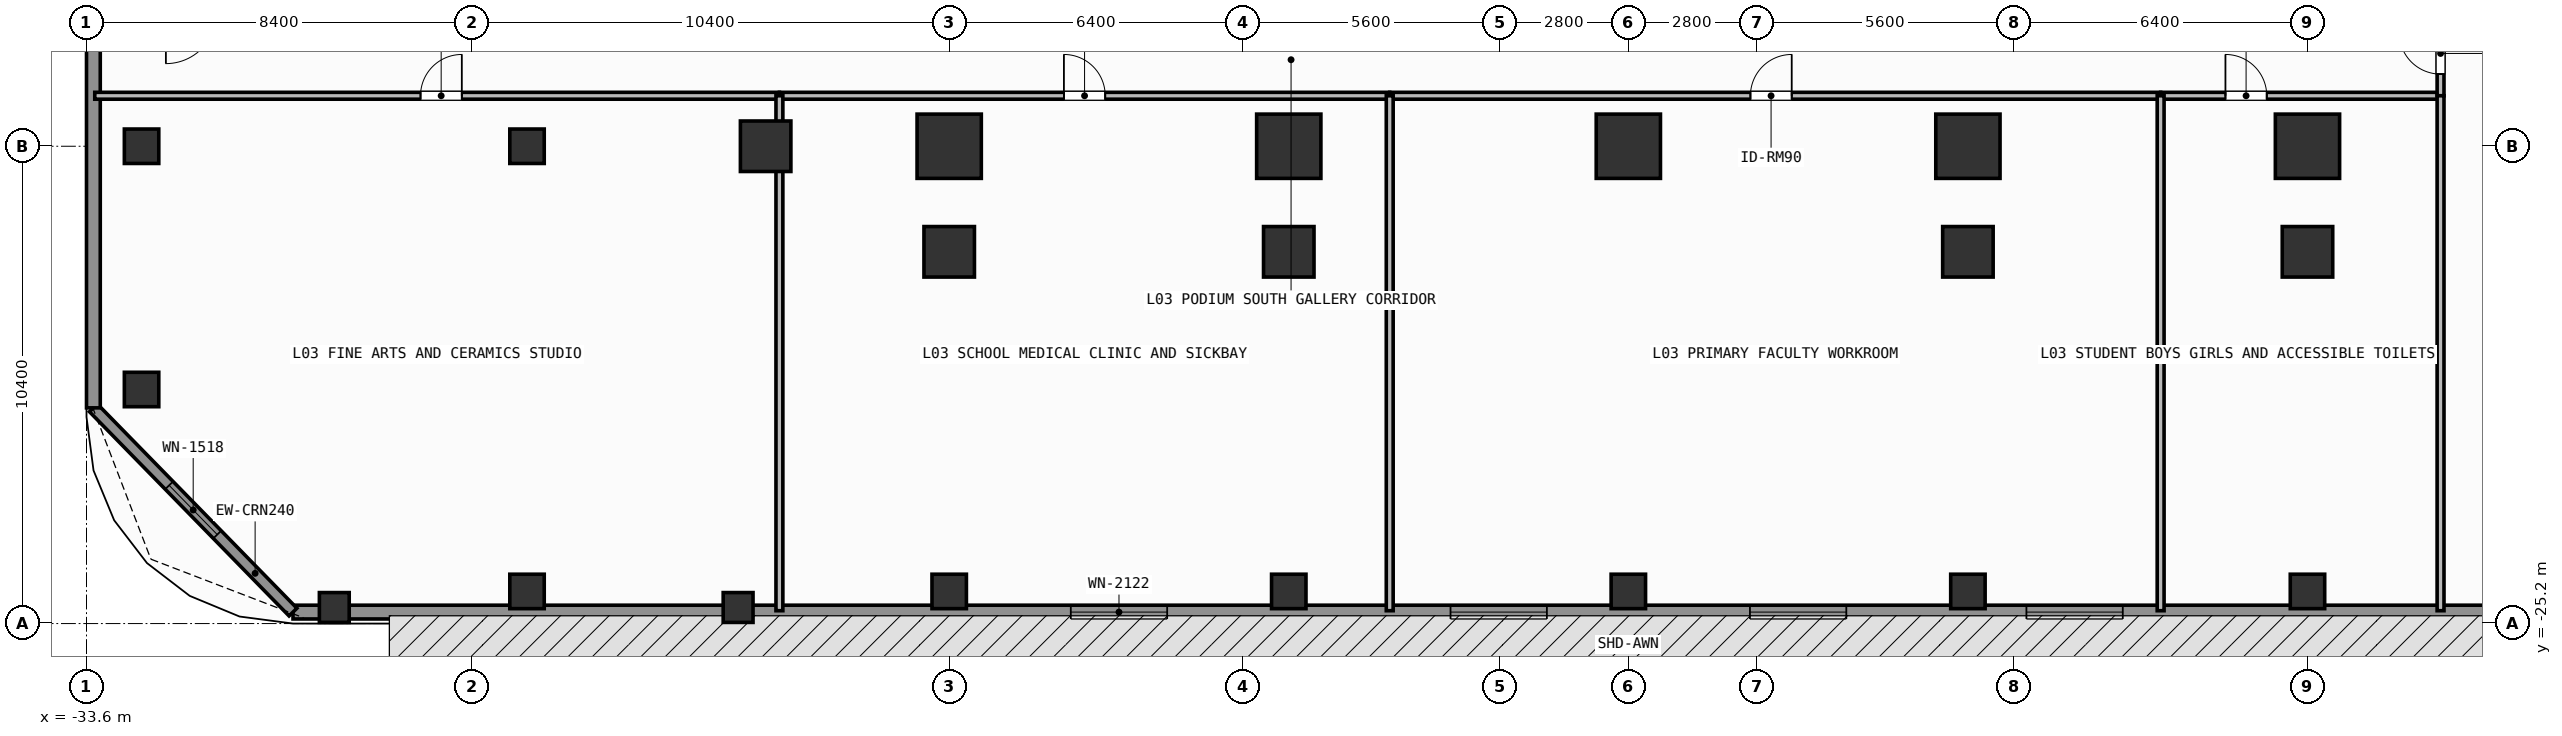
"""IFC4 building model, lengths in metres.
Left out: names, types, materials, properties, quantities, classifications, styles, units other than length and angle.
Written with IfcOpenShell. Run it as: python <this file> out.ifc"""

import sys

from ifc_helpers import new_model, si_unit, direction, frame, frame_2d, origin, origin_2d, place, context, subcontext, project, spatial, rectangle, extrude, element, fill, save


model = new_model("IFC4")
c1 = context("Model", 3, precision=1e-05, world=origin(), true_north=direction((0.0, 1.0)))
c2 = subcontext(c1, "Body", "Model", "MODEL_VIEW")
j1 = project(units=[si_unit("LENGTHUNIT", "METRE"), si_unit("PLANEANGLEUNIT", "RADIAN")], contexts=[c1])
p1 = place(None, origin())
s1 = spatial("IfcSite", under=j1, at=p1, CompositionType="ELEMENT")
p2 = place(p1, origin())
s2 = spatial("IfcBuilding", under=s1, at=p2, CompositionType="ELEMENT")
p3 = place(p2, frame((0.0, 0.0, 9.0)))
s3 = spatial("IfcBuildingStorey", under=s2, at=p3, CompositionType="ELEMENT", Elevation=9.0)
for number, where, z_axis, x_axis in (
    (1, (-14.8, -14.8, 0.0), (0.0, 0.0, 1.0), (1.0, 0.0, 0.0)),
    (2, (-7.4, -14.8, 0.0), (0.0, 0.0, 1.0), (1.0, 0.0, 0.0)),
    (3, (0.0, -14.8, 0.0), (0.0, 0.0, 1.0), (1.0, 0.0, 0.0)),
    (4, (7.4, -14.8, 0.0), (0.0, 0.0, 1.0), (1.0, 0.0, 0.0)),
    (5, (14.8, -14.8, 0.0), (0.0, 0.0, 1.0), (1.0, 0.0, 0.0)),
):
    element("IfcColumn", number, at=place(p3, frame(where, z_axis=z_axis, x_axis=x_axis)), inside=s3, PredefinedType="COLUMN", context=c2, shape_type="SweptSolid", body=[
        extrude(rectangle(XDim=1.4, YDim=1.4, at=origin_2d()), origin(), (0.0, 0.0, 1.0), 4.2),
    ])
for number, where, z_axis, x_axis in (
    (6, (-18.8, -14.8, 0.0), (0.0, 0.0, 1.0), (1.0, 0.0, 0.0)),
    (7, (-14.8, -17.1, 0.0), (0.0, 0.0, 1.0), (1.0, 0.0, 0.0)),
    (8, (-7.4, -17.1, 0.0), (0.0, 0.0, 1.0), (1.0, 0.0, 0.0)),
    (9, (7.4, -17.1, 0.0), (0.0, 0.0, 1.0), (1.0, 0.0, 0.0)),
    (10, (14.8, -17.1, 0.0), (0.0, 0.0, 1.0), (1.0, 0.0, 0.0)),
):
    element("IfcColumn", number, at=place(p3, frame(where, z_axis=z_axis, x_axis=x_axis)), inside=s3, PredefinedType="COLUMN", context=c2, shape_type="SweptSolid", body=[
        extrude(rectangle(XDim=1.1, YDim=1.1, at=origin_2d()), origin(), (0.0, 0.0, 1.0), 4.2),
    ])
for number, where, z_axis, x_axis in (
    (11, (-32.4, -14.8, 0.0), (0.0, 0.0, 1.0), (1.0, 0.0, 0.0)),
    (12, (-24.0, -24.5, 0.0), (0.0, 0.0, 1.0), (1.0, 0.0, 0.0)),
    (13, (-24.0, -14.8, 0.0), (0.0, 0.0, 1.0), (1.0, 0.0, 0.0)),
    (14, (-14.8, -24.5, 0.0), (0.0, 0.0, 1.0), (1.0, 0.0, 0.0)),
    (15, (-7.4, -24.5, 0.0), (0.0, 0.0, 1.0), (1.0, 0.0, 0.0)),
    (16, (0.0, -24.5, 0.0), (0.0, 0.0, 1.0), (1.0, 0.0, 0.0)),
    (17, (7.4, -24.5, 0.0), (0.0, 0.0, 1.0), (1.0, 0.0, 0.0)),
    (18, (14.8, -24.5, 0.0), (0.0, 0.0, 1.0), (1.0, 0.0, 0.0)),
    (19, (-32.4, -20.1, 0.0), (0.0, 0.0, 1.0), (1.0, 0.0, 0.0)),
):
    element("IfcColumn", number, at=place(p3, frame(where, z_axis=z_axis, x_axis=x_axis)), inside=s3, PredefinedType="COLUMN", context=c2, shape_type="SweptSolid", body=[
        extrude(rectangle(XDim=0.75, YDim=0.75, at=origin_2d()), origin(), (0.0, 0.0, 1.0), 4.2),
    ])
for number, where, z_axis, x_axis in (
    (20, (-28.2, -24.85, 0.0), (0.0, 0.0, 1.0), (1.0, 0.0, 0.0)),
    (21, (-19.4, -24.85, 0.0), (0.0, 0.0, 1.0), (1.0, 0.0, 0.0)),
):
    element("IfcColumn", number, at=place(p3, frame(where, z_axis=z_axis, x_axis=x_axis)), inside=s3, PredefinedType="PILASTER", context=c2, shape_type="SweptSolid", body=[
        extrude(rectangle(XDim=0.65, YDim=0.65, at=origin_2d()), origin(), (0.0, 0.0, 1.0), 4.2),
    ])
p4 = place(p3, frame((29.1, -24.95, 0.0), z_axis=(0.0, 0.0, 1.0), x_axis=(-1.0, 0.0, 0.0)))
e22 = element("IfcWall", 22, at=p4, inside=s3, PredefinedType="SOLIDWALL", context=c2, shape_type="SweptSolid", body=[
    extrude(rectangle(XDim=58.2, YDim=0.3, at=frame_2d((29.1, 0.0))), origin(), (0.0, 0.0, 1.0), 3.96),
])
p5 = place(p4, frame((39.15, 0.0, 0.85)))
e23 = element("IfcOpeningElement", 23, at=p5, cuts=e22, PredefinedType="OPENING", context=c2, shape_type="SweptSolid", body=[
    extrude(rectangle(XDim=2.1, YDim=2.2, at=frame_2d((1.05, 1.1))), frame((0.0, 0.16, 0.0), z_axis=(0.0, -1.0, 0.0), x_axis=(1.0, 0.0, 0.0)), (0.0, 0.0, 1.0), 0.32),
])
p6 = place(p4, frame((30.875, 0.0, 0.85)))
e24 = element("IfcOpeningElement", 24, at=p6, cuts=e22, PredefinedType="OPENING", context=c2, shape_type="SweptSolid", body=[
    extrude(rectangle(XDim=2.1, YDim=2.2, at=frame_2d((1.05, 1.1))), frame((0.0, 0.16, 0.0), z_axis=(0.0, -1.0, 0.0), x_axis=(1.0, 0.0, 0.0)), (0.0, 0.0, 1.0), 0.32),
])
p7 = place(p4, frame((24.35, 0.0, 0.85)))
e25 = element("IfcOpeningElement", 25, at=p7, cuts=e22, PredefinedType="OPENING", context=c2, shape_type="SweptSolid", body=[
    extrude(rectangle(XDim=2.1, YDim=2.2, at=frame_2d((1.05, 1.1))), frame((0.0, 0.16, 0.0), z_axis=(0.0, -1.0, 0.0), x_axis=(1.0, 0.0, 0.0)), (0.0, 0.0, 1.0), 0.32),
])
p8 = place(p4, frame((18.325, 0.0, 0.85)))
e26 = element("IfcOpeningElement", 26, at=p8, cuts=e22, PredefinedType="OPENING", context=c2, shape_type="SweptSolid", body=[
    extrude(rectangle(XDim=2.1, YDim=2.2, at=frame_2d((1.05, 1.1))), frame((0.0, 0.16, 0.0), z_axis=(0.0, -1.0, 0.0), x_axis=(1.0, 0.0, 0.0)), (0.0, 0.0, 1.0), 0.32),
])
p9 = place(p3, frame((-29.1, -24.95, 0.0), z_axis=(0.0, 0.0, 1.0), x_axis=(-0.69901822973, 0.715103848756, 0.0)))
e27 = element("IfcWall", 27, at=p9, inside=s3, PredefinedType="SOLIDWALL", context=c2, shape_type="SweptSolid", body=[
    extrude(rectangle(XDim=6.223, YDim=0.24, at=frame_2d((3.111, 0.0))), origin(), (0.0, 0.0, 1.0), 3.96),
])
p10 = place(p9, frame((2.362, 0.0, 0.85)))
e28 = element("IfcOpeningElement", 28, at=p10, cuts=e27, PredefinedType="OPENING", context=c2, shape_type="SweptSolid", body=[
    extrude(rectangle(XDim=1.5, YDim=1.85, at=frame_2d((0.75, 0.925))), frame((0.0, 0.13, 0.0), z_axis=(0.0, -1.0, 0.0), x_axis=(1.0, 0.0, 0.0)), (0.0, 0.0, 1.0), 0.26),
])
p11 = place(p3, frame((-33.45, -20.5, 0.0), z_axis=(0.0, 0.0, 1.0), x_axis=(0.0, 1.0, 0.0)))
e29 = element("IfcWall", 29, at=p11, inside=s3, PredefinedType="SOLIDWALL", context=c2, shape_type="SweptSolid", body=[
    extrude(rectangle(XDim=14.09, YDim=0.3, at=frame_2d((7.045, 0.0))), origin(), (0.0, 0.0, 1.0), 3.96),
])
p12 = place(p3, frame((-33.42, -13.7, 0.0), z_axis=(0.0, 0.0, 1.0), x_axis=(1.0, 0.0, 0.0)))
e30 = element("IfcWall", 30, at=p12, inside=s3, PredefinedType="PARTITIONING", context=c2, shape_type="SweptSolid", body=[
    extrude(rectangle(XDim=14.92, YDim=0.15, at=frame_2d((7.46, 0.0))), origin(), (0.0, 0.0, 1.0), 3.96),
])
p13 = place(p12, frame((7.099, 0.0, 0.0)))
e31 = element("IfcOpeningElement", 31, at=p13, cuts=e30, PredefinedType="OPENING", context=c2, shape_type="SweptSolid", body=[
    extrude(rectangle(XDim=0.9, YDim=2.1, at=frame_2d((0.45, 1.05))), frame((0.0, 0.085, 0.0), z_axis=(0.0, -1.0, 0.0), x_axis=(1.0, 0.0, 0.0)), (0.0, 0.0, 1.0), 0.17),
])
p14 = place(p3, frame((-18.5, -13.7, 0.0), z_axis=(0.0, 0.0, 1.0), x_axis=(1.0, 0.0, 0.0)))
e32 = element("IfcWall", 32, at=p14, inside=s3, PredefinedType="PARTITIONING", context=c2, shape_type="SweptSolid", body=[
    extrude(rectangle(XDim=13.3, YDim=0.15, at=frame_2d((6.65, 0.0))), origin(), (0.0, 0.0, 1.0), 3.96),
])
p15 = place(p14, frame((6.2, 0.0, 0.0)))
e33 = element("IfcOpeningElement", 33, at=p15, cuts=e32, PredefinedType="OPENING", context=c2, shape_type="SweptSolid", body=[
    extrude(rectangle(XDim=0.9, YDim=2.1, at=frame_2d((0.45, 1.05))), frame((0.0, 0.085, 0.0), z_axis=(0.0, -1.0, 0.0), x_axis=(1.0, 0.0, 0.0)), (0.0, 0.0, 1.0), 0.17),
])
p16 = place(p3, frame((-5.2, -13.7, 0.0), z_axis=(0.0, 0.0, 1.0), x_axis=(1.0, 0.0, 0.0)))
e34 = element("IfcWall", 34, at=p16, inside=s3, PredefinedType="PARTITIONING", context=c2, shape_type="SweptSolid", body=[
    extrude(rectangle(XDim=16.8, YDim=0.15, at=frame_2d((8.4, 0.0))), origin(), (0.0, 0.0, 1.0), 3.96),
])
p17 = place(p16, frame((7.861, 0.0, 0.0)))
e35 = element("IfcOpeningElement", 35, at=p17, cuts=e34, PredefinedType="OPENING", context=c2, shape_type="SweptSolid", body=[
    extrude(rectangle(XDim=0.9, YDim=2.1, at=frame_2d((0.45, 1.05))), frame((0.0, 0.085, 0.0), z_axis=(0.0, -1.0, 0.0), x_axis=(1.0, 0.0, 0.0)), (0.0, 0.0, 1.0), 0.17),
])
p18 = place(p3, frame((11.6, -13.7, 0.0), z_axis=(0.0, 0.0, 1.0), x_axis=(1.0, 0.0, 0.0)))
e36 = element("IfcWall", 36, at=p18, inside=s3, PredefinedType="PARTITIONING", context=c2, shape_type="SweptSolid", body=[
    extrude(rectangle(XDim=6.05, YDim=0.15, at=frame_2d((3.025, 0.0))), origin(), (0.0, 0.0, 1.0), 3.96),
])
p19 = place(p18, frame((1.412, 0.0, 0.0)))
e37 = element("IfcOpeningElement", 37, at=p19, cuts=e36, PredefinedType="OPENING", context=c2, shape_type="SweptSolid", body=[
    extrude(rectangle(XDim=0.9, YDim=2.1, at=frame_2d((0.45, 1.05))), frame((0.0, 0.085, 0.0), z_axis=(0.0, -1.0, 0.0), x_axis=(1.0, 0.0, 0.0)), (0.0, 0.0, 1.0), 0.17),
])
p20 = place(p3, frame((17.7, -13.7, 0.0), z_axis=(0.0, 0.0, 1.0), x_axis=(0.0, 1.0, 0.0)))
e38 = element("IfcWall", 38, at=p20, inside=s3, PredefinedType="PARTITIONING", context=c2, shape_type="SweptSolid", body=[
    extrude(rectangle(XDim=2.0, YDim=0.15, at=frame_2d((1.0, 0.0))), origin(), (0.0, 0.0, 1.0), 3.96),
])
p21 = place(p20, frame((0.472, 0.0, 0.0)))
e39 = element("IfcOpeningElement", 39, at=p21, cuts=e38, PredefinedType="OPENING", context=c2, shape_type="SweptSolid", body=[
    extrude(rectangle(XDim=0.9, YDim=2.1, at=frame_2d((0.45, 1.05))), frame((0.0, 0.085, 0.0), z_axis=(0.0, -1.0, 0.0), x_axis=(1.0, 0.0, 0.0)), (0.0, 0.0, 1.0), 0.17),
])
p22 = place(p3, frame((-18.5, -24.92, 0.0), z_axis=(0.0, 0.0, 1.0), x_axis=(0.0, 1.0, 0.0)))
e40 = element("IfcWall", 40, at=p22, inside=s3, PredefinedType="PARTITIONING", context=c2, shape_type="SweptSolid", body=[
    extrude(rectangle(XDim=11.22, YDim=0.15, at=frame_2d((5.61, 0.0))), origin(), (0.0, 0.0, 1.0), 3.05),
])
for number, where, z_axis, x_axis in (
    (41, (-5.2, -24.92, 0.0), (0.0, 0.0, 1.0), (0.0, 1.0, 0.0)),
    (42, (11.6, -24.92, 0.0), (0.0, 0.0, 1.0), (0.0, 1.0, 0.0)),
    (43, (17.7, -13.7, 0.0), (0.0, 0.0, 1.0), (0.0, -1.0, 0.0)),
):
    element("IfcWall", number, at=place(p3, frame(where, z_axis=z_axis, x_axis=x_axis)), inside=s3, PredefinedType="PARTITIONING", context=c2, shape_type="SweptSolid", body=[
        extrude(rectangle(XDim=11.22, YDim=0.15, at=frame_2d((5.61, 0.0))), origin(), (0.0, 0.0, 1.0), 3.96),
    ])
p23 = place(p10, origin())
e44 = element("IfcWindow", 44, at=p23, inside=s3, PartitioningType="SINGLE_PANEL", PredefinedType="WINDOW", context=c2, shape_type="SweptSolid", body=[
    extrude(rectangle(XDim=1.5, YDim=1.85, at=frame_2d((0.75, 0.925))), frame((0.0, 0.03, 0.0), z_axis=(0.0, -1.0, 0.0), x_axis=(1.0, 0.0, 0.0)), (0.0, 0.0, 1.0), 0.06),
])
fill(e28, e44)
p24 = place(p5, origin())
e45 = element("IfcWindow", 45, at=p24, inside=s3, PartitioningType="SINGLE_PANEL", PredefinedType="WINDOW", context=c2, shape_type="SweptSolid", body=[
    extrude(rectangle(XDim=2.1, YDim=2.2, at=frame_2d((1.05, 1.1))), frame((0.0, 0.03, 0.0), z_axis=(0.0, -1.0, 0.0), x_axis=(1.0, 0.0, 0.0)), (0.0, 0.0, 1.0), 0.06),
])
fill(e23, e45)
p25 = place(p6, origin())
e46 = element("IfcWindow", 46, at=p25, inside=s3, PartitioningType="SINGLE_PANEL", PredefinedType="WINDOW", context=c2, shape_type="SweptSolid", body=[
    extrude(rectangle(XDim=2.1, YDim=2.2, at=frame_2d((1.05, 1.1))), frame((0.0, 0.03, 0.0), z_axis=(0.0, -1.0, 0.0), x_axis=(1.0, 0.0, 0.0)), (0.0, 0.0, 1.0), 0.06),
])
fill(e24, e46)
p26 = place(p7, origin())
e47 = element("IfcWindow", 47, at=p26, inside=s3, PartitioningType="SINGLE_PANEL", PredefinedType="WINDOW", context=c2, shape_type="SweptSolid", body=[
    extrude(rectangle(XDim=2.1, YDim=2.2, at=frame_2d((1.05, 1.1))), frame((0.0, 0.03, 0.0), z_axis=(0.0, -1.0, 0.0), x_axis=(1.0, 0.0, 0.0)), (0.0, 0.0, 1.0), 0.06),
])
fill(e25, e47)
p27 = place(p8, origin())
e48 = element("IfcWindow", 48, at=p27, inside=s3, PartitioningType="SINGLE_PANEL", PredefinedType="WINDOW", context=c2, shape_type="SweptSolid", body=[
    extrude(rectangle(XDim=2.1, YDim=2.2, at=frame_2d((1.05, 1.1))), frame((0.0, 0.03, 0.0), z_axis=(0.0, -1.0, 0.0), x_axis=(1.0, 0.0, 0.0)), (0.0, 0.0, 1.0), 0.06),
])
fill(e26, e48)
p28 = place(p13, origin())
e49 = element("IfcDoor", 49, at=p28, inside=s3, OperationType="SINGLE_SWING_RIGHT", PredefinedType="DOOR", context=c2, shape_type="SweptSolid", body=[
    extrude(rectangle(XDim=0.9, YDim=2.1, at=frame_2d((0.45, 1.05))), frame((0.0, 0.025, 0.0), z_axis=(0.0, -1.0, 0.0), x_axis=(1.0, 0.0, 0.0)), (0.0, 0.0, 1.0), 0.05),
])
fill(e31, e49)
p29 = place(p15, origin())
e50 = element("IfcDoor", 50, at=p29, inside=s3, OperationType="SINGLE_SWING_LEFT", PredefinedType="DOOR", context=c2, shape_type="SweptSolid", body=[
    extrude(rectangle(XDim=0.9, YDim=2.1, at=frame_2d((0.45, 1.05))), frame((0.0, 0.025, 0.0), z_axis=(0.0, -1.0, 0.0), x_axis=(1.0, 0.0, 0.0)), (0.0, 0.0, 1.0), 0.05),
])
fill(e33, e50)
p30 = place(p17, origin())
e51 = element("IfcDoor", 51, at=p30, inside=s3, OperationType="SINGLE_SWING_RIGHT", PredefinedType="DOOR", context=c2, shape_type="SweptSolid", body=[
    extrude(rectangle(XDim=0.9, YDim=2.1, at=frame_2d((0.45, 1.05))), frame((0.0, 0.025, 0.0), z_axis=(0.0, -1.0, 0.0), x_axis=(1.0, 0.0, 0.0)), (0.0, 0.0, 1.0), 0.05),
])
fill(e35, e51)
p31 = place(p19, origin())
e52 = element("IfcDoor", 52, at=p31, inside=s3, OperationType="SINGLE_SWING_LEFT", PredefinedType="DOOR", context=c2, shape_type="SweptSolid", body=[
    extrude(rectangle(XDim=0.9, YDim=2.1, at=frame_2d((0.45, 1.05))), frame((0.0, 0.025, 0.0), z_axis=(0.0, -1.0, 0.0), x_axis=(1.0, 0.0, 0.0)), (0.0, 0.0, 1.0), 0.05),
])
fill(e37, e52)
p32 = place(p21, origin())
e53 = element("IfcDoor", 53, at=p32, inside=s3, OperationType="SINGLE_SWING_RIGHT", PredefinedType="DOOR", context=c2, shape_type="SweptSolid", body=[
    extrude(rectangle(XDim=0.9, YDim=2.1, at=frame_2d((0.45, 1.05))), frame((0.0, 0.025, 0.0), z_axis=(0.0, -1.0, 0.0), x_axis=(1.0, 0.0, 0.0)), (0.0, 0.0, 1.0), 0.05),
])
fill(e39, e53)
save(model, sys.argv[1])
